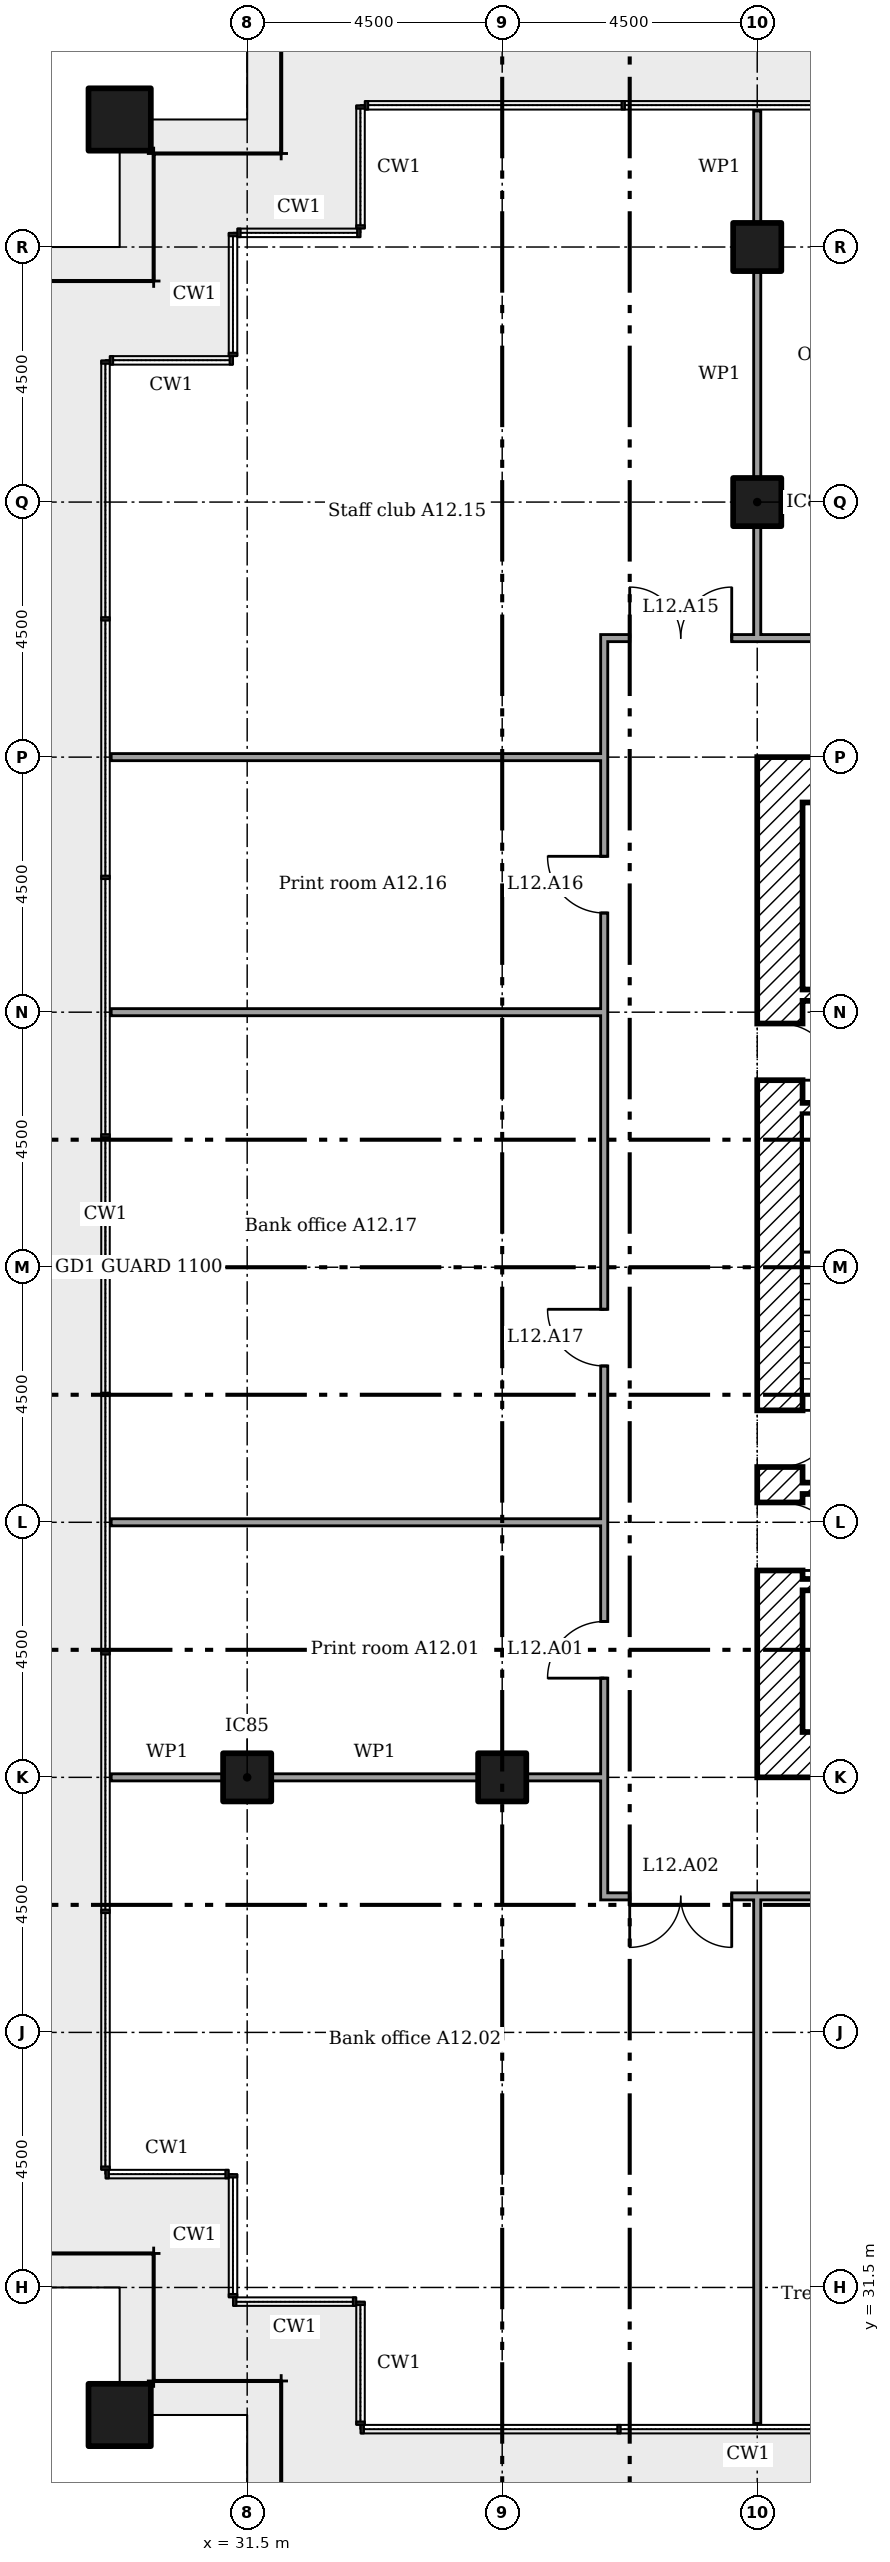
"""IFC4 building model, lengths in metres.
Left out: names, types, materials, properties, quantities, classifications, styles, units other than length and angle.
Written with IfcOpenShell. Run it as: python <this file> out.ifc"""

import sys

from ifc_helpers import new_model, si_unit, direction, frame, frame_2d, origin, origin_2d, place, context, subcontext, project, spatial, rectangle, extrude, element, fill, save


model = new_model("IFC4")
c1 = context("Model", 3, precision=1e-05, world=origin(), true_north=direction((0.0, 1.0)))
c2 = subcontext(c1, "Body", "Model", "MODEL_VIEW")
j1 = project(units=[si_unit("LENGTHUNIT", "METRE"), si_unit("PLANEANGLEUNIT", "RADIAN")], contexts=[c1])
p1 = place(None, origin())
s1 = spatial("IfcSite", under=j1, at=p1, CompositionType="ELEMENT")
p2 = place(p1, origin())
s2 = spatial("IfcBuilding", under=s1, at=p2, CompositionType="ELEMENT")
p3 = place(p2, frame((0.0, 0.0, 54.6)))
s3 = spatial("IfcBuildingStorey", under=s2, at=p3, CompositionType="ELEMENT", Elevation=54.6)
for number, where in (
    (1, (29.25, 69.75, 0.0)),
    (2, (29.25, 29.25, 0.0)),
):
    element("IfcColumn", number, at=place(p3, frame(where)), inside=s3, PredefinedType="COLUMN", context=c2, shape_type="SweptSolid", body=[
        extrude(rectangle(XDim=1.1, YDim=1.1, at=origin_2d()), origin(), (0.0, 0.0, 1.0), 3.6),
    ])
for number, where in (
    (3, (31.5, 40.5, 0.0)),
    (4, (36.0, 40.5, 0.0)),
    (5, (40.5, 63.0, 0.0)),
    (6, (40.5, 67.5, 0.0)),
):
    element("IfcColumn", number, at=place(p3, frame(where)), inside=s3, PredefinedType="COLUMN", context=c2, shape_type="SweptSolid", body=[
        extrude(rectangle(XDim=0.85, YDim=0.85, at=origin_2d()), origin(), (0.0, 0.0, 1.0), 3.6),
    ])
for number, where in (
    (7, (41.3, 58.1, 0.0)),
    (8, (41.3, 40.9, 0.0)),
):
    element("IfcWall", number, at=place(p3, frame(where)), inside=s3, PredefinedType="SHEAR", context=c2, shape_type="SweptSolid", body=[
        extrude(rectangle(XDim=16.4, YDim=0.8, at=frame_2d((8.2, 0.0))), origin(), (0.0, 0.0, 1.0), 3.35),
    ])
p4 = place(p3, frame((40.9, 40.5, 0.0), z_axis=(0.0, 0.0, 1.0), x_axis=(0.0, 1.0, 0.0)))
e9 = element("IfcWall", 9, at=p4, inside=s3, PredefinedType="SHEAR", context=c2, shape_type="SweptSolid", body=[
    extrude(rectangle(XDim=18.0, YDim=0.8, at=frame_2d((9.0, 0.0))), origin(), (0.0, 0.0, 1.0), 3.35),
])
p5 = place(p4, frame((3.65, 0.0, 0.0)))
e10 = element("IfcOpeningElement", 10, at=p5, cuts=e9, PredefinedType="OPENING", context=c2, shape_type="SweptSolid", body=[
    extrude(rectangle(XDim=1.2, YDim=2.1, at=frame_2d((0.6, 1.05))), frame((0.0, 0.41, 0.0), z_axis=(0.0, -1.0, 0.0), x_axis=(1.0, 0.0, 0.0)), (0.0, 0.0, 1.0), 0.82),
])
p6 = place(p4, frame((5.475, 0.0, 0.0)))
e11 = element("IfcOpeningElement", 11, at=p6, cuts=e9, PredefinedType="OPENING", context=c2, shape_type="SweptSolid", body=[
    extrude(rectangle(XDim=1.0, YDim=2.1, at=frame_2d((0.5, 1.05))), frame((0.0, 0.41, 0.0), z_axis=(0.0, -1.0, 0.0), x_axis=(1.0, 0.0, 0.0)), (0.0, 0.0, 1.0), 0.82),
])
p7 = place(p4, frame((12.3, 0.0, 0.0)))
e12 = element("IfcOpeningElement", 12, at=p7, cuts=e9, PredefinedType="OPENING", context=c2, shape_type="SweptSolid", body=[
    extrude(rectangle(XDim=1.0, YDim=2.1, at=frame_2d((0.5, 1.05))), frame((0.0, 0.41, 0.0), z_axis=(0.0, -1.0, 0.0), x_axis=(1.0, 0.0, 0.0)), (0.0, 0.0, 1.0), 0.82),
])
p8 = place(p3, frame((41.3, 54.3, 0.0)))
e13 = element("IfcWall", 13, at=p8, inside=s3, PredefinedType="SHEAR", context=c2, shape_type="SweptSolid", body=[
    extrude(rectangle(XDim=5.433, YDim=0.2, at=frame_2d((2.717, 0.0))), origin(), (0.0, 0.0, 1.0), 3.35),
])
p9 = place(p8, frame((0.983, 0.0, 0.0)))
e14 = element("IfcOpeningElement", 14, at=p9, cuts=e13, PredefinedType="OPENING", context=c2, shape_type="SweptSolid", body=[
    extrude(rectangle(XDim=1.1, YDim=2.1, at=frame_2d((0.55, 1.05))), frame((0.0, 0.11, 0.0), z_axis=(0.0, -1.0, 0.0), x_axis=(1.0, 0.0, 0.0)), (0.0, 0.0, 1.0), 0.22),
])
p10 = place(p8, frame((3.65, 0.0, 0.0)))
e15 = element("IfcOpeningElement", 15, at=p10, cuts=e13, PredefinedType="OPENING", context=c2, shape_type="SweptSolid", body=[
    extrude(rectangle(XDim=1.1, YDim=2.1, at=frame_2d((0.55, 1.05))), frame((0.0, 0.11, 0.0), z_axis=(0.0, -1.0, 0.0), x_axis=(1.0, 0.0, 0.0)), (0.0, 0.0, 1.0), 0.22),
])
p11 = place(p3, frame((41.3, 43.9, 0.0)))
e16 = element("IfcWall", 16, at=p11, inside=s3, PredefinedType="SHEAR", context=c2, shape_type="SweptSolid", body=[
    extrude(rectangle(XDim=16.4, YDim=0.2, at=frame_2d((8.2, 0.0))), origin(), (0.0, 0.0, 1.0), 3.35),
])
p12 = place(p11, frame((0.933, 0.0, 0.0)))
e17 = element("IfcOpeningElement", 17, at=p12, cuts=e16, PredefinedType="OPENING", context=c2, shape_type="SweptSolid", body=[
    extrude(rectangle(XDim=1.2, YDim=2.1, at=frame_2d((0.6, 1.05))), frame((0.0, 0.11, 0.0), z_axis=(0.0, -1.0, 0.0), x_axis=(1.0, 0.0, 0.0)), (0.0, 0.0, 1.0), 0.22),
])
p13 = place(p11, frame((3.6, 0.0, 0.0)))
e18 = element("IfcOpeningElement", 18, at=p13, cuts=e16, PredefinedType="OPENING", context=c2, shape_type="SweptSolid", body=[
    extrude(rectangle(XDim=1.2, YDim=2.1, at=frame_2d((0.6, 1.05))), frame((0.0, 0.11, 0.0), z_axis=(0.0, -1.0, 0.0), x_axis=(1.0, 0.0, 0.0)), (0.0, 0.0, 1.0), 0.22),
])
p14 = place(p11, frame((6.267, 0.0, 0.0)))
e19 = element("IfcOpeningElement", 19, at=p14, cuts=e16, PredefinedType="OPENING", context=c2, shape_type="SweptSolid", body=[
    extrude(rectangle(XDim=1.2, YDim=2.1, at=frame_2d((0.6, 1.05))), frame((0.0, 0.11, 0.0), z_axis=(0.0, -1.0, 0.0), x_axis=(1.0, 0.0, 0.0)), (0.0, 0.0, 1.0), 0.22),
])
p15 = place(p11, frame((8.933, 0.0, 0.0)))
e20 = element("IfcOpeningElement", 20, at=p15, cuts=e16, PredefinedType="OPENING", context=c2, shape_type="SweptSolid", body=[
    extrude(rectangle(XDim=1.2, YDim=2.1, at=frame_2d((0.6, 1.05))), frame((0.0, 0.11, 0.0), z_axis=(0.0, -1.0, 0.0), x_axis=(1.0, 0.0, 0.0)), (0.0, 0.0, 1.0), 0.22),
])
p16 = place(p3, frame((41.3, 52.3, 0.0)))
e21 = element("IfcWall", 21, at=p16, inside=s3, PredefinedType="SHEAR", context=c2, shape_type="SweptSolid", body=[
    extrude(rectangle(XDim=2.7, YDim=0.2, at=frame_2d((1.35, 0.0))), origin(), (0.0, 0.0, 1.0), 3.35),
])
p17 = place(p3, frame((41.3, 45.6, 0.0)))
e22 = element("IfcWall", 22, at=p17, inside=s3, PredefinedType="SHEAR", context=c2, shape_type="SweptSolid", body=[
    extrude(rectangle(XDim=2.7, YDim=0.2, at=frame_2d((1.35, 0.0))), origin(), (0.0, 0.0, 1.0), 3.35),
])
p18 = place(p17, frame((0.95, 0.0, 0.0)))
e23 = element("IfcOpeningElement", 23, at=p18, cuts=e22, PredefinedType="OPENING", context=c2, shape_type="SweptSolid", body=[
    extrude(rectangle(XDim=1.0, YDim=2.1, at=frame_2d((0.5, 1.05))), frame((0.0, 0.11, 0.0), z_axis=(0.0, -1.0, 0.0), x_axis=(1.0, 0.0, 0.0)), (0.0, 0.0, 1.0), 0.22),
])
p19 = place(p3, frame((37.738, 38.4, 0.0)))
e24 = element("IfcWall", 24, at=p19, inside=s3, PredefinedType="PARTITIONING", context=c2, shape_type="SweptSolid", body=[
    extrude(rectangle(XDim=23.525, YDim=0.125, at=frame_2d((11.762, 0.0))), origin(), (0.0, 0.0, 1.0), 3.45),
])
p20 = place(p19, frame((0.512, 0.0, 0.0)))
e25 = element("IfcOpeningElement", 25, at=p20, cuts=e24, PredefinedType="OPENING", context=c2, shape_type="SweptSolid", body=[
    extrude(rectangle(XDim=1.8, YDim=2.1, at=frame_2d((0.9, 1.05))), frame((0.0, 0.073, 0.0), z_axis=(0.0, -1.0, 0.0), x_axis=(1.0, 0.0, 0.0)), (0.0, 0.0, 1.0), 0.145),
])
p21 = place(p19, frame((4.968, 0.0, 0.0)))
e26 = element("IfcOpeningElement", 26, at=p21, cuts=e24, PredefinedType="OPENING", context=c2, shape_type="SweptSolid", body=[
    extrude(rectangle(XDim=1.0, YDim=2.1, at=frame_2d((0.5, 1.05))), frame((0.0, 0.073, 0.0), z_axis=(0.0, -1.0, 0.0), x_axis=(1.0, 0.0, 0.0)), (0.0, 0.0, 1.0), 0.145),
])
p22 = place(p19, frame((11.262, 0.0, 0.0)))
e27 = element("IfcOpeningElement", 27, at=p22, cuts=e24, PredefinedType="OPENING", context=c2, shape_type="SweptSolid", body=[
    extrude(rectangle(XDim=1.0, YDim=2.1, at=frame_2d((0.5, 1.05))), frame((0.0, 0.073, 0.0), z_axis=(0.0, -1.0, 0.0), x_axis=(1.0, 0.0, 0.0)), (0.0, 0.0, 1.0), 0.145),
])
p23 = place(p19, frame((17.558, 0.0, 0.0)))
e28 = element("IfcOpeningElement", 28, at=p23, cuts=e24, PredefinedType="OPENING", context=c2, shape_type="SweptSolid", body=[
    extrude(rectangle(XDim=1.0, YDim=2.1, at=frame_2d((0.5, 1.05))), frame((0.0, 0.073, 0.0), z_axis=(0.0, -1.0, 0.0), x_axis=(1.0, 0.0, 0.0)), (0.0, 0.0, 1.0), 0.145),
])
p24 = place(p19, frame((21.212, 0.0, 0.0)))
e29 = element("IfcOpeningElement", 29, at=p24, cuts=e24, PredefinedType="OPENING", context=c2, shape_type="SweptSolid", body=[
    extrude(rectangle(XDim=1.8, YDim=2.1, at=frame_2d((0.9, 1.05))), frame((0.0, 0.073, 0.0), z_axis=(0.0, -1.0, 0.0), x_axis=(1.0, 0.0, 0.0)), (0.0, 0.0, 1.0), 0.145),
])
p25 = place(p3, frame((29.1, 40.5, 0.0)))
e30 = element("IfcWall", 30, at=p25, inside=s3, PredefinedType="PARTITIONING", context=c2, shape_type="SweptSolid", body=[
    extrude(rectangle(XDim=1.975, YDim=0.125, at=frame_2d((0.987, 0.0))), origin(), (0.0, 0.0, 1.0), 2.676),
])
p26 = place(p3, frame((31.925, 40.5, 0.0)))
e31 = element("IfcWall", 31, at=p26, inside=s3, PredefinedType="PARTITIONING", context=c2, shape_type="SweptSolid", body=[
    extrude(rectangle(XDim=3.65, YDim=0.125, at=frame_2d((1.825, 0.0))), origin(), (0.0, 0.0, 1.0), 2.676),
])
p27 = place(p3, frame((36.425, 40.5, 0.0)))
e32 = element("IfcWall", 32, at=p27, inside=s3, PredefinedType="PARTITIONING", context=c2, shape_type="SweptSolid", body=[
    extrude(rectangle(XDim=1.375, YDim=0.125, at=frame_2d((0.688, 0.0))), origin(), (0.0, 0.0, 1.0), 2.676),
])
for number, where in (
    (33, (29.1, 45.0, 0.0)),
    (34, (29.1, 54.0, 0.0)),
    (35, (29.1, 58.5, 0.0)),
):
    element("IfcWall", number, at=place(p3, frame(where)), inside=s3, PredefinedType="PARTITIONING", context=c2, shape_type="SweptSolid", body=[
        extrude(rectangle(XDim=8.7, YDim=0.125, at=frame_2d((4.35, 0.0))), origin(), (0.0, 0.0, 1.0), 2.766),
    ])
p28 = place(p3, frame((37.738, 60.6, 0.0)))
e36 = element("IfcWall", 36, at=p28, inside=s3, PredefinedType="PARTITIONING", context=c2, shape_type="SweptSolid", body=[
    extrude(rectangle(XDim=23.525, YDim=0.125, at=frame_2d((11.762, 0.0))), origin(), (0.0, 0.0, 1.0), 3.45),
])
p29 = place(p28, frame((21.212, 0.0, 0.0)))
e37 = element("IfcOpeningElement", 37, at=p29, cuts=e36, PredefinedType="OPENING", context=c2, shape_type="SweptSolid", body=[
    extrude(rectangle(XDim=1.8, YDim=2.1, at=frame_2d((0.9, 1.05))), frame((0.0, 0.073, 0.0), z_axis=(0.0, -1.0, 0.0), x_axis=(1.0, 0.0, 0.0)), (0.0, 0.0, 1.0), 0.145),
])
p30 = place(p28, frame((17.558, 0.0, 0.0)))
e38 = element("IfcOpeningElement", 38, at=p30, cuts=e36, PredefinedType="OPENING", context=c2, shape_type="SweptSolid", body=[
    extrude(rectangle(XDim=1.0, YDim=2.1, at=frame_2d((0.5, 1.05))), frame((0.0, 0.073, 0.0), z_axis=(0.0, -1.0, 0.0), x_axis=(1.0, 0.0, 0.0)), (0.0, 0.0, 1.0), 0.145),
])
p31 = place(p28, frame((13.968, 0.0, 0.0)))
e39 = element("IfcOpeningElement", 39, at=p31, cuts=e36, PredefinedType="OPENING", context=c2, shape_type="SweptSolid", body=[
    extrude(rectangle(XDim=1.0, YDim=2.1, at=frame_2d((0.5, 1.05))), frame((0.0, 0.073, 0.0), z_axis=(0.0, -1.0, 0.0), x_axis=(1.0, 0.0, 0.0)), (0.0, 0.0, 1.0), 0.145),
])
p32 = place(p28, frame((9.012, 0.0, 0.0)))
e40 = element("IfcOpeningElement", 40, at=p32, cuts=e36, PredefinedType="OPENING", context=c2, shape_type="SweptSolid", body=[
    extrude(rectangle(XDim=1.0, YDim=2.1, at=frame_2d((0.5, 1.05))), frame((0.0, 0.073, 0.0), z_axis=(0.0, -1.0, 0.0), x_axis=(1.0, 0.0, 0.0)), (0.0, 0.0, 1.0), 0.145),
])
p33 = place(p28, frame((4.058, 0.0, 0.0)))
e41 = element("IfcOpeningElement", 41, at=p33, cuts=e36, PredefinedType="OPENING", context=c2, shape_type="SweptSolid", body=[
    extrude(rectangle(XDim=1.0, YDim=2.1, at=frame_2d((0.5, 1.05))), frame((0.0, 0.073, 0.0), z_axis=(0.0, -1.0, 0.0), x_axis=(1.0, 0.0, 0.0)), (0.0, 0.0, 1.0), 0.145),
])
p34 = place(p28, frame((0.512, 0.0, 0.0)))
e42 = element("IfcOpeningElement", 42, at=p34, cuts=e36, PredefinedType="OPENING", context=c2, shape_type="SweptSolid", body=[
    extrude(rectangle(XDim=1.8, YDim=2.1, at=frame_2d((0.9, 1.05))), frame((0.0, 0.073, 0.0), z_axis=(0.0, -1.0, 0.0), x_axis=(1.0, 0.0, 0.0)), (0.0, 0.0, 1.0), 0.145),
])
p35 = place(p3, frame((37.8, 38.462, 0.0), z_axis=(0.0, 0.0, 1.0), x_axis=(0.0, 1.0, 0.0)))
e43 = element("IfcWall", 43, at=p35, inside=s3, PredefinedType="PARTITIONING", context=c2, shape_type="SweptSolid", body=[
    extrude(rectangle(XDim=22.075, YDim=0.125, at=frame_2d((11.038, 0.0))), origin(), (0.0, 0.0, 1.0), 3.45),
])
p36 = place(p35, frame((3.788, 0.0, 0.0)))
e44 = element("IfcOpeningElement", 44, at=p36, cuts=e43, PredefinedType="OPENING", context=c2, shape_type="SweptSolid", body=[
    extrude(rectangle(XDim=1.0, YDim=2.1, at=frame_2d((0.5, 1.05))), frame((0.0, 0.073, 0.0), z_axis=(0.0, -1.0, 0.0), x_axis=(1.0, 0.0, 0.0)), (0.0, 0.0, 1.0), 0.145),
])
p37 = place(p35, frame((17.288, 0.0, 0.0)))
e45 = element("IfcOpeningElement", 45, at=p37, cuts=e43, PredefinedType="OPENING", context=c2, shape_type="SweptSolid", body=[
    extrude(rectangle(XDim=1.0, YDim=2.1, at=frame_2d((0.5, 1.05))), frame((0.0, 0.073, 0.0), z_axis=(0.0, -1.0, 0.0), x_axis=(1.0, 0.0, 0.0)), (0.0, 0.0, 1.0), 0.145),
])
p38 = place(p35, frame((9.295, 0.0, 0.0)))
e46 = element("IfcOpeningElement", 46, at=p38, cuts=e43, PredefinedType="OPENING", context=c2, shape_type="SweptSolid", body=[
    extrude(rectangle(XDim=1.0, YDim=2.1, at=frame_2d((0.5, 1.05))), frame((0.0, 0.073, 0.0), z_axis=(0.0, -1.0, 0.0), x_axis=(1.0, 0.0, 0.0)), (0.0, 0.0, 1.0), 0.145),
])
p39 = place(p3, frame((40.5, 29.1, 0.0), z_axis=(0.0, 0.0, 1.0), x_axis=(0.0, 1.0, 0.0)))
e47 = element("IfcWall", 47, at=p39, inside=s3, PredefinedType="PARTITIONING", context=c2, shape_type="SweptSolid", body=[
    extrude(rectangle(XDim=9.3, YDim=0.125, at=frame_2d((4.65, 0.0))), origin(), (0.0, 0.0, 1.0), 2.766),
])
p40 = place(p3, frame((40.5, 60.6, 0.0), z_axis=(0.0, 0.0, 1.0), x_axis=(0.0, 1.0, 0.0)))
e48 = element("IfcWall", 48, at=p40, inside=s3, PredefinedType="PARTITIONING", context=c2, shape_type="SweptSolid", body=[
    extrude(rectangle(XDim=1.975, YDim=0.125, at=frame_2d((0.987, 0.0))), origin(), (0.0, 0.0, 1.0), 2.676),
])
p41 = place(p3, frame((40.5, 63.425, 0.0), z_axis=(0.0, 0.0, 1.0), x_axis=(0.0, 1.0, 0.0)))
e49 = element("IfcWall", 49, at=p41, inside=s3, PredefinedType="PARTITIONING", context=c2, shape_type="SweptSolid", body=[
    extrude(rectangle(XDim=3.65, YDim=0.125, at=frame_2d((1.825, 0.0))), origin(), (0.0, 0.0, 1.0), 2.676),
])
p42 = place(p3, frame((40.5, 67.925, 0.0), z_axis=(0.0, 0.0, 1.0), x_axis=(0.0, 1.0, 0.0)))
e50 = element("IfcWall", 50, at=p42, inside=s3, PredefinedType="PARTITIONING", context=c2, shape_type="SweptSolid", body=[
    extrude(rectangle(XDim=1.975, YDim=0.125, at=frame_2d((0.987, 0.0))), origin(), (0.0, 0.0, 1.0), 2.676),
])
p43 = place(p5, frame((1.2, 0.0, 0.0), x_axis=(-1.0, 0.0, 0.0)))
e51 = element("IfcDoor", 51, at=p43, inside=s3, OperationType="SINGLE_SWING_LEFT", PredefinedType="DOOR", context=c2, shape_type="SweptSolid", body=[
    extrude(rectangle(XDim=1.2, YDim=2.1, at=frame_2d((0.6, 1.05))), frame((0.0, 0.025, 0.0), z_axis=(0.0, -1.0, 0.0), x_axis=(1.0, 0.0, 0.0)), (0.0, 0.0, 1.0), 0.05),
])
fill(e10, e51)
p44 = place(p6, frame((1.0, 0.0, 0.0), x_axis=(-1.0, 0.0, 0.0)))
e52 = element("IfcDoor", 52, at=p44, inside=s3, OperationType="SINGLE_SWING_RIGHT", PredefinedType="DOOR", context=c2, shape_type="SweptSolid", body=[
    extrude(rectangle(XDim=1.0, YDim=2.1, at=frame_2d((0.5, 1.05))), frame((0.0, 0.025, 0.0), z_axis=(0.0, -1.0, 0.0), x_axis=(1.0, 0.0, 0.0)), (0.0, 0.0, 1.0), 0.05),
])
fill(e11, e52)
p45 = place(p7, frame((1.0, 0.0, 0.0), x_axis=(-1.0, 0.0, 0.0)))
e53 = element("IfcDoor", 53, at=p45, inside=s3, OperationType="SINGLE_SWING_LEFT", PredefinedType="DOOR", context=c2, shape_type="SweptSolid", body=[
    extrude(rectangle(XDim=1.0, YDim=2.1, at=frame_2d((0.5, 1.05))), frame((0.0, 0.025, 0.0), z_axis=(0.0, -1.0, 0.0), x_axis=(1.0, 0.0, 0.0)), (0.0, 0.0, 1.0), 0.05),
])
fill(e12, e53)
p46 = place(p36, origin())
e54 = element("IfcDoor", 54, at=p46, inside=s3, OperationType="SINGLE_SWING_RIGHT", PredefinedType="DOOR", context=c2, shape_type="SweptSolid", body=[
    extrude(rectangle(XDim=1.0, YDim=2.1, at=frame_2d((0.5, 1.05))), frame((0.0, 0.025, 0.0), z_axis=(0.0, -1.0, 0.0), x_axis=(1.0, 0.0, 0.0)), (0.0, 0.0, 1.0), 0.05),
])
fill(e44, e54)
p47 = place(p20, frame((1.8, 0.0, 0.0), x_axis=(-1.0, 0.0, 0.0)))
e55 = element("IfcDoor", 55, at=p47, inside=s3, OperationType="DOUBLE_DOOR_SINGLE_SWING", PredefinedType="DOOR", context=c2, shape_type="SweptSolid", body=[
    extrude(rectangle(XDim=1.8, YDim=2.1, at=frame_2d((0.9, 1.05))), frame((0.0, 0.025, 0.0), z_axis=(0.0, -1.0, 0.0), x_axis=(1.0, 0.0, 0.0)), (0.0, 0.0, 1.0), 0.05),
])
fill(e25, e55)
p48 = place(p34, origin())
e56 = element("IfcDoor", 56, at=p48, inside=s3, OperationType="DOUBLE_DOOR_SINGLE_SWING", PredefinedType="DOOR", context=c2, shape_type="SweptSolid", body=[
    extrude(rectangle(XDim=1.8, YDim=2.1, at=frame_2d((0.9, 1.05))), frame((0.0, 0.025, 0.0), z_axis=(0.0, -1.0, 0.0), x_axis=(1.0, 0.0, 0.0)), (0.0, 0.0, 1.0), 0.05),
])
fill(e42, e56)
p49 = place(p37, origin())
e57 = element("IfcDoor", 57, at=p49, inside=s3, OperationType="SINGLE_SWING_LEFT", PredefinedType="DOOR", context=c2, shape_type="SweptSolid", body=[
    extrude(rectangle(XDim=1.0, YDim=2.1, at=frame_2d((0.5, 1.05))), frame((0.0, 0.025, 0.0), z_axis=(0.0, -1.0, 0.0), x_axis=(1.0, 0.0, 0.0)), (0.0, 0.0, 1.0), 0.05),
])
fill(e45, e57)
p50 = place(p38, origin())
e58 = element("IfcDoor", 58, at=p50, inside=s3, OperationType="SINGLE_SWING_LEFT", PredefinedType="DOOR", context=c2, shape_type="SweptSolid", body=[
    extrude(rectangle(XDim=1.0, YDim=2.1, at=frame_2d((0.5, 1.05))), frame((0.0, 0.025, 0.0), z_axis=(0.0, -1.0, 0.0), x_axis=(1.0, 0.0, 0.0)), (0.0, 0.0, 1.0), 0.05),
])
fill(e46, e58)
save(model, sys.argv[1])
